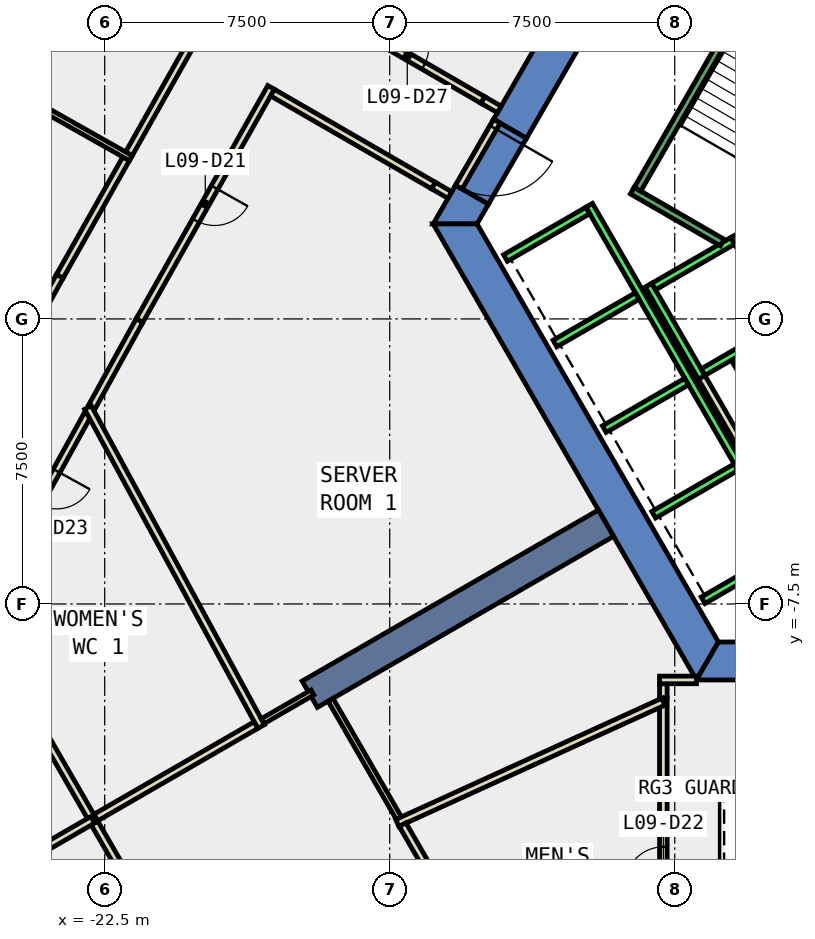
"""IFC4 building model, lengths in metres.
Left out: names, types, materials, properties, quantities, classifications, styles, units other than length and angle.
Written with IfcOpenShell. Run it as: python <this file> out.ifc"""

import sys

from ifc_helpers import new_model, si_unit, direction, frame, frame_2d, origin, place, context, subcontext, project, spatial, polyline, rectangle, outline, extrude, element, fill, save


model = new_model("IFC4")
c1 = context("Model", 3, precision=1e-05, world=origin(), true_north=direction((0.0, 1.0)))
c2 = subcontext(c1, "Body", "Model", "MODEL_VIEW")
j1 = project(units=[si_unit("LENGTHUNIT", "METRE"), si_unit("PLANEANGLEUNIT", "RADIAN")], contexts=[c1])
p1 = place(None, origin())
s1 = spatial("IfcSite", under=j1, at=p1, CompositionType="ELEMENT")
p2 = place(p1, origin())
s2 = spatial("IfcBuilding", under=s1, at=p2, CompositionType="ELEMENT")
p3 = place(p2, frame((0.0, 0.0, 47.6)))
s3 = spatial("IfcBuildingStorey", under=s2, at=p3, CompositionType="ELEMENT", Elevation=47.6)
p4 = place(p3, frame((0.0, 0.0, -0.4)))
e1 = element("IfcWall", 1, at=p4, inside=s3, PredefinedType="SHEAR", context=c2, shape_type="SweptSolid", body=[
    extrude(outline(polyline([(-12.267, 5.252), (-11.402, 4.752), (-6.351, 13.5), (-6.928, 14.5), (-12.267, 5.252)])), origin(), (0.0, 0.0, 1.0), 4.2),
])
p5 = place(p3, frame((0.0, 0.0, -0.4)))
e2 = element("IfcWall", 2, at=p5, inside=s3, PredefinedType="SHEAR", context=c2, shape_type="SweptSolid", body=[
    extrude(outline(polyline([(-12.402, 3.02), (-13.267, 3.52), (-13.856, 2.5), (-12.702, 2.5), (-12.402, 3.02)])), origin(), (0.0, 0.0, 1.0), 4.2),
])
p6 = place(p3, frame((0.0, 0.0, 3.6)))
e3 = element("IfcWall", 3, at=p6, inside=s3, PredefinedType="SHEAR", context=c2, shape_type="SweptSolid", body=[
    extrude(outline(polyline([(-13.267, 3.52), (-12.402, 3.02), (-11.402, 4.752), (-12.267, 5.252), (-13.267, 3.52)])), origin(), (0.0, 0.0, 1.0), 0.2),
])
p7 = place(p3, frame((0.0, 0.0, -0.4)))
e4 = element("IfcWall", 4, at=p7, inside=s3, PredefinedType="SHEAR", context=c2, shape_type="SweptSolid", body=[
    extrude(outline(polyline([(-13.856, 2.5), (-6.928, -9.5), (-6.351, -8.5), (-12.702, 2.5), (-13.856, 2.5)])), origin(), (0.0, 0.0, 1.0), 4.2),
])
p8 = place(p3, frame((0.0, 0.0, -0.4)))
e5 = element("IfcWall", 5, at=p8, inside=s3, PredefinedType="SHEAR", context=c2, shape_type="SweptSolid", body=[
    extrude(outline(polyline([(3.75, -9.5), (3.75, -8.5), (-6.351, -8.5), (-6.928, -9.5), (3.75, -9.5)])), origin(), (0.0, 0.0, 1.0), 4.2),
])
p9 = place(p3, frame((-9.31, -5.375, -0.4), z_axis=(0.0, 0.0, 1.0), x_axis=(-0.866017533419, -0.500013631625, 0.0)))
e6 = element("IfcWall", 6, at=p9, inside=s3, PredefinedType="SHEAR", context=c2, shape_type="SweptSolid", body=[
    extrude(rectangle(XDim=9.0, YDim=0.8, at=frame_2d((4.5, 0.0))), origin(), (0.0, 0.0, 1.0), 4.2),
])
p10 = place(p3, frame((-16.96, 8.308, 0.0), z_axis=(0.0, 0.0, 1.0), x_axis=(0.866018717003, -0.500011581666, 0.0)))
e7 = element("IfcWall", 7, at=p10, inside=s3, PredefinedType="PARTITIONING", context=c2, shape_type="SweptSolid", body=[
    extrude(rectangle(XDim=5.092, YDim=0.2, at=frame_2d((2.546, 0.0))), origin(), (0.0, 0.0, 1.0), 3.8),
])
p11 = place(p10, frame((2.296, 0.0, 0.0)))
e8 = element("IfcOpeningElement", 8, at=p11, cuts=e7, PredefinedType="OPENING", context=c2, shape_type="SweptSolid", body=[
    extrude(rectangle(XDim=1.0, YDim=2.1, at=frame_2d((0.5, 1.05))), frame((0.0, 0.11, 0.0), z_axis=(0.0, -1.0, 0.0), x_axis=(1.0, 0.0, 0.0)), (0.0, 0.0, 1.0), 0.22),
])
p12 = place(p3, frame((-13.417, 3.26, 0.0), z_axis=(0.0, 0.0, 1.0), x_axis=(-0.866071776036, 0.499919672301, 0.0)))
e9 = element("IfcWall", 9, at=p12, inside=s3, PredefinedType="PARTITIONING", context=c2, shape_type="SweptSolid", body=[
    extrude(rectangle(XDim=0.5, YDim=0.2, at=frame_2d((0.25, 0.0))), origin(), (0.0, 0.0, 1.0), 2.4),
])
p13 = place(p3, frame((-18.122, 6.092, 0.0), z_axis=(0.0, 0.0, 1.0), x_axis=(-0.491430359405, -0.870916874251, 0.0)))
e10 = element("IfcWall", 10, at=p13, inside=s3, PredefinedType="PARTITIONING", context=c2, shape_type="SweptSolid", body=[
    extrude(rectangle(XDim=7.047, YDim=0.2, at=frame_2d((3.523, 0.0))), origin(), (0.0, 0.0, 1.0), 3.8),
])
p14 = place(p13, frame((3.024, 0.0, 0.0)))
e11 = element("IfcOpeningElement", 11, at=p14, cuts=e10, PredefinedType="OPENING", context=c2, shape_type="SweptSolid", body=[
    extrude(rectangle(XDim=1.0, YDim=2.1, at=frame_2d((0.5, 1.05))), frame((0.0, 0.11, 0.0), z_axis=(0.0, -1.0, 0.0), x_axis=(1.0, 0.0, 0.0)), (0.0, 0.0, 1.0), 0.22),
])
p15 = place(p3, frame((-21.585, -0.045, 0.0), z_axis=(0.0, 0.0, 1.0), x_axis=(-0.483139162319, -0.875543573921, 0.0)))
e12 = element("IfcWall", 12, at=p15, inside=s3, PredefinedType="PARTITIONING", context=c2, shape_type="SweptSolid", body=[
    extrude(rectangle(XDim=2.61, YDim=0.2, at=frame_2d((1.305, 0.0))), origin(), (0.0, 0.0, 1.0), 3.8),
])
p16 = place(p3, frame((-22.942, -2.505, 0.0), z_axis=(0.0, 0.0, 1.0), x_axis=(-0.48320751977, -0.875505849688, 0.0)))
e13 = element("IfcWall", 13, at=p16, inside=s3, PredefinedType="PARTITIONING", context=c2, shape_type="SweptSolid", body=[
    extrude(rectangle(XDim=4.412, YDim=0.2, at=frame_2d((2.206, 0.0))), origin(), (0.0, 0.0, 1.0), 3.8),
])
p17 = place(p16, frame((1.706, 0.0, 0.0)))
e14 = element("IfcOpeningElement", 14, at=p17, cuts=e13, PredefinedType="OPENING", context=c2, shape_type="SweptSolid", body=[
    extrude(rectangle(XDim=1.0, YDim=2.1, at=frame_2d((0.5, 1.05))), frame((0.0, 0.11, 0.0), z_axis=(0.0, -1.0, 0.0), x_axis=(1.0, 0.0, 0.0)), (0.0, 0.0, 1.0), 0.22),
])
p18 = place(p3, frame((-21.863, 4.345, 0.0), z_axis=(0.0, 0.0, 1.0), x_axis=(0.491394823876, 0.87093692485, 0.0)))
e15 = element("IfcWall", 15, at=p18, inside=s3, PredefinedType="PARTITIONING", context=c2, shape_type="SweptSolid", body=[
    extrude(rectangle(XDim=3.547, YDim=0.2, at=frame_2d((1.773, 0.0))), origin(), (0.0, 0.0, 1.0), 3.8),
])
p19 = place(p3, frame((-27.217, -5.284, 0.0), z_axis=(0.0, 0.0, 1.0), x_axis=(0.483151415114, 0.875536812517, 0.0)))
e16 = element("IfcWall", 16, at=p19, inside=s3, PredefinedType="PARTITIONING", context=c2, shape_type="SweptSolid", body=[
    extrude(rectangle(XDim=7.319, YDim=0.2, at=frame_2d((3.659, 0.0))), origin(), (0.0, 0.0, 1.0), 3.8),
])
p20 = place(p19, frame((3.159, 0.0, 0.0)))
e17 = element("IfcOpeningElement", 17, at=p20, cuts=e16, PredefinedType="OPENING", context=c2, shape_type="SweptSolid", body=[
    extrude(rectangle(XDim=1.0, YDim=2.1, at=frame_2d((0.5, 1.05))), frame((0.0, 0.11, 0.0), z_axis=(0.0, -1.0, 0.0), x_axis=(1.0, 0.0, 0.0)), (0.0, 0.0, 1.0), 0.22),
])
p21 = place(p3, frame((-23.681, 1.124, 0.0), z_axis=(0.0, 0.0, 1.0), x_axis=(0.491485799319, 0.870885588965, 0.0)))
e18 = element("IfcWall", 18, at=p21, inside=s3, PredefinedType="PARTITIONING", context=c2, shape_type="SweptSolid", body=[
    extrude(rectangle(XDim=3.548, YDim=0.2, at=frame_2d((1.774, 0.0))), origin(), (0.0, 0.0, 1.0), 3.8),
])
p22 = place(p3, frame((-5.126, -2.422, 0.0), z_axis=(0.0, 0.0, 1.0), x_axis=(-0.500062241894, 0.865989465428, 0.0)))
e19 = element("IfcWall", 19, at=p22, inside=s3, PredefinedType="PARTITIONING", context=c2, shape_type="SweptSolid", body=[
    extrude(rectangle(XDim=1.7, YDim=0.2, at=frame_2d((0.85, 0.0))), origin(), (0.0, 0.0, 1.0), 3.8),
])
p23 = place(p3, frame((-5.492, -3.788, 0.0), z_axis=(0.0, 0.0, 1.0), x_axis=(-0.500008949224, 0.866020236886, 0.0)))
e20 = element("IfcWall", 20, at=p23, inside=s3, PredefinedType="PARTITIONING", context=c2, shape_type="SweptSolid", body=[
    extrude(rectangle(XDim=2.68, YDim=0.2, at=frame_2d((1.34, 0.0))), origin(), (0.0, 0.0, 1.0), 3.8),
])
p24 = place(p3, frame((-7.8, -9.972, 0.0), z_axis=(0.0, 0.0, 1.0), x_axis=(0.0, 1.0, 0.0)))
e21 = element("IfcWall", 21, at=p24, inside=s3, PredefinedType="PARTITIONING", context=c2, shape_type="SweptSolid", body=[
    extrude(rectangle(XDim=0.373, YDim=0.2, at=frame_2d((0.187, 0.0))), origin(), (0.0, 0.0, 1.0), 3.8),
])
p25 = place(p3, frame((-7.9, -9.499, 0.0), z_axis=(0.0, 0.0, 1.0), x_axis=(1.0, 0.0, 0.0)))
e22 = element("IfcWall", 22, at=p25, inside=s3, PredefinedType="PARTITIONING", context=c2, shape_type="SweptSolid", body=[
    extrude(rectangle(XDim=0.971, YDim=0.2, at=frame_2d((0.485, 0.0))), origin(), (0.0, 0.0, 1.0), 3.8),
])
p26 = place(p3, frame((-7.8, -18.809, 0.0), z_axis=(0.0, 0.0, 1.0), x_axis=(0.0, 1.0, 0.0)))
e23 = element("IfcWall", 23, at=p26, inside=s3, PredefinedType="PARTITIONING", context=c2, shape_type="SweptSolid", body=[
    extrude(rectangle(XDim=8.837, YDim=0.2, at=frame_2d((4.418, 0.0))), origin(), (0.0, 0.0, 1.0), 3.8),
])
p27 = place(p26, frame((3.918, 0.0, 0.0)))
e24 = element("IfcOpeningElement", 24, at=p27, cuts=e23, PredefinedType="OPENING", context=c2, shape_type="SweptSolid", body=[
    extrude(rectangle(XDim=1.0, YDim=2.1, at=frame_2d((0.5, 1.05))), frame((0.0, 0.11, 0.0), z_axis=(0.0, -1.0, 0.0), x_axis=(1.0, 0.0, 0.0)), (0.0, 0.0, 1.0), 0.22),
])
p28 = place(p3, frame((-7.8, -10.072, 0.0), z_axis=(0.0, 0.0, 1.0), x_axis=(-0.910011899741, -0.414582129777, 0.0)))
e25 = element("IfcWall", 25, at=p28, inside=s3, PredefinedType="PARTITIONING", context=c2, shape_type="SweptSolid", body=[
    extrude(rectangle(XDim=7.694, YDim=0.2, at=frame_2d((3.847, 0.0))), origin(), (0.0, 0.0, 1.0), 3.8),
])
p29 = place(p3, frame((-18.384, -10.725, 0.0), z_axis=(0.0, 0.0, 1.0), x_axis=(-0.477137547132, 0.878828630119, 0.0)))
e26 = element("IfcWall", 26, at=p29, inside=s3, PredefinedType="PARTITIONING", context=c2, shape_type="SweptSolid", body=[
    extrude(rectangle(XDim=9.552, YDim=0.2, at=frame_2d((4.776, 0.0))), origin(), (0.0, 0.0, 1.0), 3.8),
])
p30 = place(p3, frame((-14.761, -13.134, 0.0), z_axis=(0.0, 0.0, 1.0), x_axis=(-0.499704810774, 0.866195764299, 0.0)))
e27 = element("IfcWall", 27, at=p30, inside=s3, PredefinedType="PARTITIONING", context=c2, shape_type="SweptSolid", body=[
    extrude(rectangle(XDim=3.594, YDim=0.15, at=frame_2d((1.797, 0.0))), origin(), (0.0, 0.0, 1.0), 3.8),
])
p31 = place(p3, frame((-17.033, -9.829, 0.0), z_axis=(0.0, 0.0, 1.0), x_axis=(-0.866094414679, -0.49988045057, 0.0)))
e28 = element("IfcWall", 28, at=p31, inside=s3, PredefinedType="PARTITIONING", context=c2, shape_type="SweptSolid", body=[
    extrude(rectangle(XDim=1.516, YDim=0.15, at=frame_2d((0.758, 0.0))), origin(), (0.0, 0.0, 1.0), 3.8),
])
p32 = place(p3, frame((-11.527, -18.735, 0.0), z_axis=(0.0, 0.0, 1.0), x_axis=(-0.499976457224, 0.866038995786, 0.0)))
e29 = element("IfcWall", 29, at=p32, inside=s3, PredefinedType="PARTITIONING", context=c2, shape_type="SweptSolid", body=[
    extrude(rectangle(XDim=6.268, YDim=0.2, at=frame_2d((3.134, 0.0))), origin(), (0.0, 0.0, 1.0), 3.8),
])
p33 = place(p3, frame((-18.519, -10.687, 0.0), z_axis=(0.0, 0.0, 1.0), x_axis=(-0.866063668779, -0.499933717229, 0.0)))
e30 = element("IfcWall", 30, at=p33, inside=s3, PredefinedType="PARTITIONING", context=c2, shape_type="SweptSolid", body=[
    extrude(rectangle(XDim=4.969, YDim=0.2, at=frame_2d((2.484, 0.0))), origin(), (0.0, 0.0, 1.0), 3.8),
])
p34 = place(p3, frame((-22.822, -13.171, 0.0), z_axis=(0.0, 0.0, 1.0), x_axis=(-0.499974913987, 0.866039886717, 0.0)))
e31 = element("IfcWall", 31, at=p34, inside=s3, PredefinedType="PARTITIONING", context=c2, shape_type="SweptSolid", body=[
    extrude(rectangle(XDim=6.222, YDim=0.2, at=frame_2d((3.111, 0.0))), origin(), (0.0, 0.0, 1.0), 3.8),
])
p35 = place(p3, frame((-19.699, -18.581, 0.0), z_axis=(0.0, 0.0, 1.0), x_axis=(-0.499899838407, 0.866083224385, 0.0)))
e32 = element("IfcWall", 32, at=p35, inside=s3, PredefinedType="PARTITIONING", context=c2, shape_type="SweptSolid", body=[
    extrude(rectangle(XDim=6.235, YDim=0.2, at=frame_2d((3.118, 0.0))), origin(), (0.0, 0.0, 1.0), 3.8),
])
p36 = place(p3, frame((-22.816, -13.181, 0.0), z_axis=(0.0, 0.0, 1.0), x_axis=(-0.86601529143, -0.500017514703, 0.0)))
e33 = element("IfcWall", 33, at=p36, inside=s3, PredefinedType="PARTITIONING", context=c2, shape_type="SweptSolid", body=[
    extrude(rectangle(XDim=9.932, YDim=0.2, at=frame_2d((4.966, 0.0))), origin(), (0.0, 0.0, 1.0), 3.8),
])
p37 = place(p3, frame((-21.813, 4.231, 0.0), z_axis=(0.0, 0.0, 1.0), x_axis=(-0.870901264369, 0.491458022337, 0.0)))
e34 = element("IfcWall", 34, at=p37, inside=s3, PredefinedType="PARTITIONING", context=c2, shape_type="SweptSolid", body=[
    extrude(rectangle(XDim=7.6, YDim=0.15, at=frame_2d((3.8, 0.0))), origin(), (0.0, 0.0, 1.0), 3.8),
])
p38 = place(p3, frame((-12.18, 5.202, 0.0), z_axis=(0.0, 0.0, 1.0), x_axis=(-0.50002537861, -0.866010750942, 0.0)))
e35 = element("IfcWall", 35, at=p38, inside=s3, PredefinedType="PARTITIONING", context=c2, shape_type="SweptSolid", body=[
    extrude(rectangle(XDim=2.0, YDim=0.2, at=frame_2d((1.0, 0.0))), origin(), (0.0, 0.0, 1.0), 2.4),
])
p39 = place(p38, frame((0.19, 0.0, 0.0)))
e36 = element("IfcOpeningElement", 36, at=p39, cuts=e35, PredefinedType="OPENING", context=c2, shape_type="SweptSolid", body=[
    extrude(rectangle(XDim=1.8, YDim=2.1, at=frame_2d((0.9, 1.05))), frame((0.0, 0.11, 0.0), z_axis=(0.0, -1.0, 0.0), x_axis=(1.0, 0.0, 0.0)), (0.0, 0.0, 1.0), 0.22),
])
p40 = place(p3, frame((-12.55, 5.762, 0.0), z_axis=(0.0, 0.0, 1.0), x_axis=(0.866071776036, -0.499919672301, 0.0)))
e37 = element("IfcWall", 37, at=p40, inside=s3, PredefinedType="PARTITIONING", context=c2, shape_type="SweptSolid", body=[
    extrude(rectangle(XDim=0.5, YDim=0.2, at=frame_2d((0.25, 0.0))), origin(), (0.0, 0.0, 1.0), 2.4),
])
p41 = place(p3, frame((-13.85, 3.51, 0.0), z_axis=(0.0, 0.0, 1.0), x_axis=(-0.865969361037, 0.500097056325, 0.0)))
e38 = element("IfcWall", 38, at=p41, inside=s3, PredefinedType="PARTITIONING", context=c2, shape_type="SweptSolid", body=[
    extrude(rectangle(XDim=4.889, YDim=0.2, at=frame_2d((2.445, 0.0))), origin(), (0.0, 0.0, 1.0), 3.8),
])
p42 = place(p3, frame((-5.94, 2.188, 0.0), z_axis=(0.0, 0.0, 1.0), x_axis=(0.49994636267, -0.866056369097, 0.0)))
e39 = element("IfcWall", 39, at=p42, inside=s3, PredefinedType="STANDARD", context=c2, shape_type="SweptSolid", body=[
    extrude(rectangle(XDim=2.8, YDim=0.2, at=frame_2d((1.4, 0.0))), origin(), (0.0, 0.0, 1.0), 3.8),
])
p43 = place(p42, frame((1.225, 0.0, 0.0)))
e40 = element("IfcOpeningElement", 40, at=p43, cuts=e39, PredefinedType="OPENING", context=c2, shape_type="SweptSolid", body=[
    extrude(rectangle(XDim=1.1, YDim=2.1, at=frame_2d((0.55, 1.05))), frame((0.0, 0.11, 0.0), z_axis=(0.0, -1.0, 0.0), x_axis=(1.0, 0.0, 0.0)), (0.0, 0.0, 1.0), 0.22),
])
p44 = place(p3, frame((-8.192, 0.888, 0.0), z_axis=(0.0, 0.0, 1.0), x_axis=(0.49994636267, -0.866056369097, 0.0)))
e41 = element("IfcWall", 41, at=p44, inside=s3, PredefinedType="STANDARD", context=c2, shape_type="SweptSolid", body=[
    extrude(rectangle(XDim=2.8, YDim=0.2, at=frame_2d((1.4, 0.0))), origin(), (0.0, 0.0, 1.0), 3.8),
])
for number, where, z_axis, x_axis in (
    (42, (-5.977, 2.052, 0.0), (0.0, 0.0, 1.0), (-0.866, -0.5, 0.0)),
    (43, (-4.677, -0.2, 0.0), (0.0, 0.0, 1.0), (-0.866, -0.5, 0.0)),
):
    element("IfcWall", number, at=place(p3, frame(where, z_axis=z_axis, x_axis=x_axis)), inside=s3, PredefinedType="STANDARD", context=c2, shape_type="SweptSolid", body=[
        extrude(rectangle(XDim=2.399, YDim=0.2, at=frame_2d((1.2, 0.0))), origin(), (0.0, 0.0, 1.0), 3.8),
    ])
p45 = place(p3, frame((-9.751, 2.99, 0.0), z_axis=(0.0, 0.0, 1.0), x_axis=(0.50000090737, -0.866024879913, 0.0)))
e44 = element("IfcWall", 44, at=p45, inside=s3, PredefinedType="STANDARD", context=c2, shape_type="SweptSolid", body=[
    extrude(rectangle(XDim=10.6, YDim=0.2, at=frame_2d((5.3, 0.0))), origin(), (0.0, 0.0, 1.0), 3.8),
])
p46 = place(p3, frame((-9.788, 2.853, 0.0), z_axis=(0.0, 0.0, 1.0), x_axis=(-0.865998541277, -0.500046524342, 0.0)))
e45 = element("IfcWall", 45, at=p46, inside=s3, PredefinedType="STANDARD", context=c2, shape_type="SweptSolid", body=[
    extrude(rectangle(XDim=2.5, YDim=0.2, at=frame_2d((1.25, 0.0))), origin(), (0.0, 0.0, 1.0), 3.8),
])
for number, where, z_axis, x_axis in (
    (46, (-8.488, 0.602, 0.0), (0.0, 0.0, 1.0), (-0.866, -0.5, 0.0)),
    (47, (-7.188, -1.65, 0.0), (0.0, 0.0, 1.0), (-0.866, -0.5, 0.0)),
    (48, (-5.888, -3.902, 0.0), (0.0, 0.0, 1.0), (-0.866, -0.5, 0.0)),
    (49, (-4.588, -6.153, 0.0), (0.0, 0.0, 1.0), (-0.866, -0.5, 0.0)),
):
    element("IfcWall", number, at=place(p3, frame(where, z_axis=z_axis, x_axis=x_axis)), inside=s3, PredefinedType="STANDARD", context=c2, shape_type="SweptSolid", body=[
        extrude(rectangle(XDim=2.5, YDim=0.2, at=frame_2d((1.25, 0.0))), origin(), (0.0, 0.0, 1.0), 3.8),
    ])
p47 = place(p3, frame((-6.25, 2.01, 0.0), z_axis=(0.0, 0.0, 1.0), x_axis=(-0.86611865017, 0.499838457731, 0.0)))
e50 = element("IfcWall", 50, at=p47, inside=s3, PredefinedType="STANDARD", context=c2, shape_type="SweptSolid", body=[
    extrude(rectangle(XDim=2.733, YDim=0.2, at=frame_2d((1.366, 0.0))), origin(), (0.0, 0.0, 1.0), 3.8),
])
p48 = place(p3, frame((-5.03, 9.388, 0.0), z_axis=(0.0, 0.0, 1.0), x_axis=(-0.499978703459, -0.866037698999, 0.0)))
e51 = element("IfcWall", 51, at=p48, inside=s3, PredefinedType="STANDARD", context=c2, shape_type="SweptSolid", body=[
    extrude(rectangle(XDim=6.9, YDim=0.2, at=frame_2d((3.45, 0.0))), origin(), (0.0, 0.0, 1.0), 3.8),
])
p49 = place(p14, origin())
e52 = element("IfcDoor", 52, at=p49, inside=s3, OperationType="SINGLE_SWING_LEFT", PredefinedType="DOOR", context=c2, shape_type="SweptSolid", body=[
    extrude(rectangle(XDim=1.0, YDim=2.1, at=frame_2d((0.5, 1.05))), frame((0.0, 0.025, 0.0), z_axis=(0.0, -1.0, 0.0), x_axis=(1.0, 0.0, 0.0)), (0.0, 0.0, 1.0), 0.05),
])
fill(e11, e52)
p50 = place(p27, origin())
e53 = element("IfcDoor", 53, at=p50, inside=s3, OperationType="SINGLE_SWING_RIGHT", PredefinedType="DOOR", context=c2, shape_type="SweptSolid", body=[
    extrude(rectangle(XDim=1.0, YDim=2.1, at=frame_2d((0.5, 1.05))), frame((0.0, 0.025, 0.0), z_axis=(0.0, -1.0, 0.0), x_axis=(1.0, 0.0, 0.0)), (0.0, 0.0, 1.0), 0.05),
])
fill(e24, e53)
p51 = place(p17, origin())
e54 = element("IfcDoor", 54, at=p51, inside=s3, OperationType="SINGLE_SWING_LEFT", PredefinedType="DOOR", context=c2, shape_type="SweptSolid", body=[
    extrude(rectangle(XDim=1.0, YDim=2.1, at=frame_2d((0.5, 1.05))), frame((0.0, 0.025, 0.0), z_axis=(0.0, -1.0, 0.0), x_axis=(1.0, 0.0, 0.0)), (0.0, 0.0, 1.0), 0.05),
])
fill(e14, e54)
p52 = place(p11, origin())
e55 = element("IfcDoor", 55, at=p52, inside=s3, OperationType="SINGLE_SWING_LEFT", PredefinedType="DOOR", context=c2, shape_type="SweptSolid", body=[
    extrude(rectangle(XDim=1.0, YDim=2.1, at=frame_2d((0.5, 1.05))), frame((0.0, 0.025, 0.0), z_axis=(0.0, -1.0, 0.0), x_axis=(1.0, 0.0, 0.0)), (0.0, 0.0, 1.0), 0.05),
])
fill(e8, e55)
p53 = place(p39, origin())
e56 = element("IfcDoor", 56, at=p53, inside=s3, OperationType="DOUBLE_DOOR_SINGLE_SWING", PredefinedType="DOOR", context=c2, shape_type="SweptSolid", body=[
    extrude(rectangle(XDim=1.8, YDim=2.1, at=frame_2d((0.9, 1.05))), frame((0.0, 0.025, 0.0), z_axis=(0.0, -1.0, 0.0), x_axis=(1.0, 0.0, 0.0)), (0.0, 0.0, 1.0), 0.05),
])
fill(e36, e56)
save(model, sys.argv[1])
